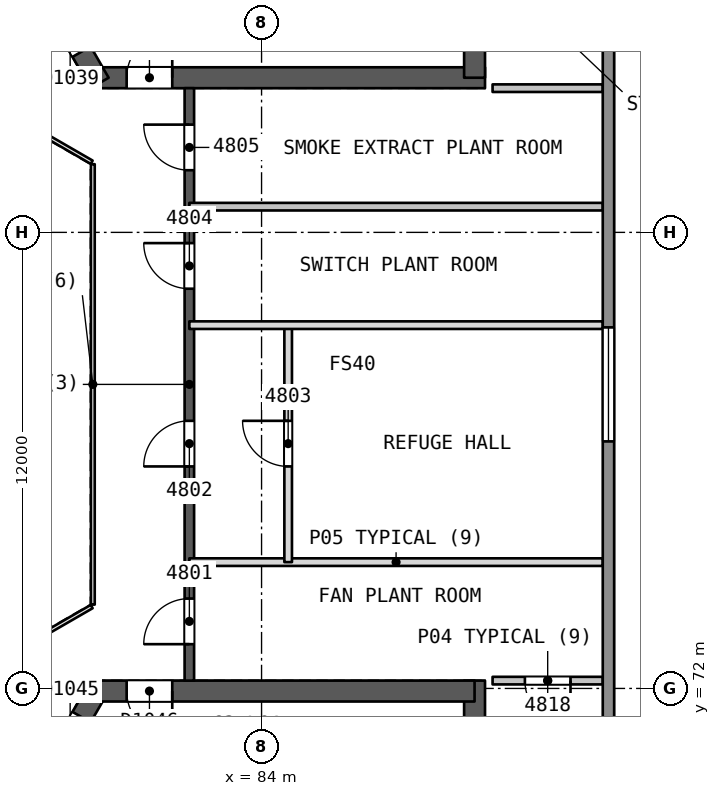
"""IFC4 building model, lengths in metres.
Left out: names, types, materials, properties, quantities, classifications, styles, units other than length and angle.
Written with IfcOpenShell. Run it as: python <this file> out.ifc"""

import sys

from ifc_helpers import new_model, si_unit, direction, frame, frame_2d, origin, place, context, subcontext, project, spatial, rectangle, extrude, element, fill, save


model = new_model("IFC4")
c1 = context("Model", 3, precision=1e-05, world=origin(), true_north=direction((0.0, 1.0)))
c2 = subcontext(c1, "Body", "Model", "MODEL_VIEW")
j1 = project(units=[si_unit("LENGTHUNIT", "METRE"), si_unit("PLANEANGLEUNIT", "RADIAN")], contexts=[c1])
p1 = place(None, origin())
s1 = spatial("IfcSite", under=j1, at=p1, CompositionType="ELEMENT")
p2 = place(p1, origin())
s2 = spatial("IfcBuilding", under=s1, at=p2, CompositionType="ELEMENT")
p3 = place(p2, frame((0.0, 0.0, 197.0)))
s3 = spatial("IfcBuildingStorey", under=s2, at=p3, CompositionType="ELEMENT", Elevation=197.0)
p4 = place(p3, frame((79.659, 88.069, 0.0), z_axis=(0.0, 0.0, 1.0), x_axis=(1.0, 0.0, 0.0)))
e1 = element("IfcWall", 1, at=p4, inside=s3, PredefinedType="SHEAR", context=c2, shape_type="SweptSolid", body=[
    extrude(rectangle(XDim=10.221, YDim=0.55, at=frame_2d((5.111, 0.0))), origin(), (0.0, 0.0, 1.0), 4.4),
])
p5 = place(p4, frame((0.791, 0.0, 0.0)))
e2 = element("IfcOpeningElement", 2, at=p5, cuts=e1, PredefinedType="OPENING", context=c2, shape_type="SweptSolid", body=[
    extrude(rectangle(XDim=1.2, YDim=2.1, at=frame_2d((0.6, 1.05))), frame((0.0, 0.286, 0.0), z_axis=(0.0, -1.0, 0.0), x_axis=(1.0, 0.0, 0.0)), (0.0, 0.0, 1.0), 0.571),
])
p6 = place(p3, frame((89.605, 88.069, 0.0), z_axis=(0.0, 0.0, 1.0), x_axis=(0.0, 1.0, 0.0)))
e3 = element("IfcWall", 3, at=p6, inside=s3, PredefinedType="SHEAR", context=c2, shape_type="SweptSolid", body=[
    extrude(rectangle(XDim=14.058, YDim=0.55, at=frame_2d((7.029, 0.0))), origin(), (0.0, 0.0, 1.0), 4.4),
])
p7 = place(p6, frame((6.475, 0.0, 0.0)))
e4 = element("IfcOpeningElement", 4, at=p7, cuts=e3, PredefinedType="OPENING", context=c2, shape_type="SweptSolid", body=[
    extrude(rectangle(XDim=1.1, YDim=2.1, at=frame_2d((0.55, 1.05))), frame((0.0, 0.286, 0.0), z_axis=(0.0, -1.0, 0.0), x_axis=(1.0, 0.0, 0.0)), (0.0, 0.0, 1.0), 0.571),
])
p8 = place(p3, frame((74.686, 96.683, 0.0), z_axis=(0.0, 0.0, 1.0), x_axis=(0.499997818338, -0.866026663364, 0.0)))
e5 = element("IfcWall", 5, at=p8, inside=s3, PredefinedType="SHEAR", context=c2, shape_type="SweptSolid", body=[
    extrude(rectangle(XDim=10.105, YDim=0.55, at=frame_2d((5.052, 0.0))), origin(), (0.0, 0.0, 1.0), 4.4),
])
p9 = place(p8, frame((7.955, 0.0, 0.0)))
e6 = element("IfcOpeningElement", 6, at=p9, cuts=e5, PredefinedType="OPENING", context=c2, shape_type="SweptSolid", body=[
    extrude(rectangle(XDim=1.2, YDim=2.1, at=frame_2d((0.6, 1.05))), frame((0.0, 0.286, 0.0), z_axis=(0.0, -1.0, 0.0), x_axis=(1.0, 0.0, 0.0)), (0.0, 0.0, 1.0), 0.571),
])
p10 = place(p3, frame((79.659, 71.931, 0.0), z_axis=(0.0, 0.0, 1.0), x_axis=(-0.500000202252, -0.866025287014, 0.0)))
e7 = element("IfcWall", 7, at=p10, inside=s3, PredefinedType="SHEAR", context=c2, shape_type="SweptSolid", body=[
    extrude(rectangle(XDim=10.221, YDim=0.55, at=frame_2d((5.111, 0.0))), origin(), (0.0, 0.0, 1.0), 4.4),
])
p11 = place(p10, frame((0.791, 0.0, 0.0)))
e8 = element("IfcOpeningElement", 8, at=p11, cuts=e7, PredefinedType="OPENING", context=c2, shape_type="SweptSolid", body=[
    extrude(rectangle(XDim=1.2, YDim=2.1, at=frame_2d((0.6, 1.05))), frame((0.0, 0.286, 0.0), z_axis=(0.0, -1.0, 0.0), x_axis=(1.0, 0.0, 0.0)), (0.0, 0.0, 1.0), 0.571),
])
p12 = place(p3, frame((89.605, 58.031, 0.0), z_axis=(0.0, 0.0, 1.0), x_axis=(0.0, 1.0, 0.0)))
e9 = element("IfcWall", 9, at=p12, inside=s3, PredefinedType="SHEAR", context=c2, shape_type="SweptSolid", body=[
    extrude(rectangle(XDim=14.175, YDim=0.55, at=frame_2d((7.087, 0.0))), origin(), (0.0, 0.0, 1.0), 4.4),
])
p13 = place(p3, frame((89.605, 71.931, 0.0), z_axis=(0.0, 0.0, 1.0), x_axis=(-1.0, 0.0, 0.0)))
e10 = element("IfcWall", 10, at=p13, inside=s3, PredefinedType="SHEAR", context=c2, shape_type="SweptSolid", body=[
    extrude(rectangle(XDim=10.105, YDim=0.55, at=frame_2d((5.052, 0.0))), origin(), (0.0, 0.0, 1.0), 4.4),
])
p14 = place(p13, frame((7.955, 0.0, 0.0)))
e11 = element("IfcOpeningElement", 11, at=p14, cuts=e10, PredefinedType="OPENING", context=c2, shape_type="SweptSolid", body=[
    extrude(rectangle(XDim=1.2, YDim=2.1, at=frame_2d((0.6, 1.05))), frame((0.0, 0.286, 0.0), z_axis=(0.0, -1.0, 0.0), x_axis=(1.0, 0.0, 0.0)), (0.0, 0.0, 1.0), 0.571),
])
p15 = place(p3, frame((82.1, 72.206, 0.0), z_axis=(0.0, 0.0, 1.0), x_axis=(0.0, 1.0, 0.0)))
e12 = element("IfcWall", 12, at=p15, inside=s3, PredefinedType="SHEAR", context=c2, shape_type="SweptSolid", body=[
    extrude(rectangle(XDim=15.588, YDim=0.25, at=frame_2d((7.794, 0.0))), origin(), (0.0, 0.0, 1.0), 3.95),
])
p16 = place(p15, frame((0.959, 0.0, 0.0)))
e13 = element("IfcOpeningElement", 13, at=p16, cuts=e12, PredefinedType="OPENING", context=c2, shape_type="SweptSolid", body=[
    extrude(rectangle(XDim=1.2, YDim=2.4, at=frame_2d((0.6, 1.2))), frame((0.0, 0.135, 0.0), z_axis=(0.0, -1.0, 0.0), x_axis=(1.0, 0.0, 0.0)), (0.0, 0.0, 1.0), 0.271),
])
p17 = place(p15, frame((5.635, 0.0, 0.0)))
e14 = element("IfcOpeningElement", 14, at=p17, cuts=e12, PredefinedType="OPENING", context=c2, shape_type="SweptSolid", body=[
    extrude(rectangle(XDim=1.2, YDim=2.4, at=frame_2d((0.6, 1.2))), frame((0.0, 0.135, 0.0), z_axis=(0.0, -1.0, 0.0), x_axis=(1.0, 0.0, 0.0)), (0.0, 0.0, 1.0), 0.271),
])
p18 = place(p15, frame((10.312, 0.0, 0.0)))
e15 = element("IfcOpeningElement", 15, at=p18, cuts=e12, PredefinedType="OPENING", context=c2, shape_type="SweptSolid", body=[
    extrude(rectangle(XDim=1.2, YDim=2.4, at=frame_2d((0.6, 1.2))), frame((0.0, 0.135, 0.0), z_axis=(0.0, -1.0, 0.0), x_axis=(1.0, 0.0, 0.0)), (0.0, 0.0, 1.0), 0.271),
])
p19 = place(p15, frame((13.43, 0.0, 0.0)))
e16 = element("IfcOpeningElement", 16, at=p19, cuts=e12, PredefinedType="OPENING", context=c2, shape_type="SweptSolid", body=[
    extrude(rectangle(XDim=1.2, YDim=2.4, at=frame_2d((0.6, 1.2))), frame((0.0, 0.135, 0.0), z_axis=(0.0, -1.0, 0.0), x_axis=(1.0, 0.0, 0.0)), (0.0, 0.0, 1.0), 0.271),
])
p20 = place(p3, frame((92.979, 75.323, 0.0), z_axis=(0.0, 0.0, 1.0), x_axis=(-1.0, 0.0, 0.0)))
e17 = element("IfcWall", 17, at=p20, inside=s3, PredefinedType="PARTITIONING", context=c2, shape_type="SweptSolid", body=[
    extrude(rectangle(XDim=10.879, YDim=0.2, at=frame_2d((5.44, 0.0))), origin(), (0.0, 0.0, 1.0), 3.95),
])
p21 = place(p3, frame((92.979, 72.206, 0.0), z_axis=(0.0, 0.0, 1.0), x_axis=(-1.0, 0.0, 0.0)))
e18 = element("IfcWall", 18, at=p21, inside=s3, PredefinedType="PARTITIONING", context=c2, shape_type="SweptSolid", body=[
    extrude(rectangle(XDim=2.9, YDim=0.2, at=frame_2d((1.45, 0.0))), origin(), (0.0, 0.0, 1.0), 3.95),
])
p22 = place(p21, frame((0.85, 0.0, 0.0)))
e19 = element("IfcOpeningElement", 19, at=p22, cuts=e18, PredefinedType="OPENING", context=c2, shape_type="SweptSolid", body=[
    extrude(rectangle(XDim=1.2, YDim=2.4, at=frame_2d((0.6, 1.2))), frame((0.0, 0.11, 0.0), z_axis=(0.0, -1.0, 0.0), x_axis=(1.0, 0.0, 0.0)), (0.0, 0.0, 1.0), 0.221),
])
p23 = place(p3, frame((84.7, 75.323, 0.0), z_axis=(0.0, 0.0, 1.0), x_axis=(0.0, 1.0, 0.0)))
e20 = element("IfcWall", 20, at=p23, inside=s3, PredefinedType="PARTITIONING", context=c2, shape_type="SweptSolid", body=[
    extrude(rectangle(XDim=6.235, YDim=0.2, at=frame_2d((3.118, 0.0))), origin(), (0.0, 0.0, 1.0), 3.95),
])
p24 = place(p23, frame((2.518, 0.0, 0.0)))
e21 = element("IfcOpeningElement", 21, at=p24, cuts=e20, PredefinedType="OPENING", context=c2, shape_type="SweptSolid", body=[
    extrude(rectangle(XDim=1.2, YDim=2.4, at=frame_2d((0.6, 1.2))), frame((0.0, 0.11, 0.0), z_axis=(0.0, -1.0, 0.0), x_axis=(1.0, 0.0, 0.0)), (0.0, 0.0, 1.0), 0.221),
])
for number, where, z_axis, x_axis in (
    (22, (92.979, 81.559, 0.0), (0.0, 0.0, 1.0), (-1.0, 0.0, 0.0)),
    (23, (92.979, 84.677, 0.0), (0.0, 0.0, 1.0), (-1.0, 0.0, 0.0)),
):
    element("IfcWall", number, at=place(p3, frame(where, z_axis=z_axis, x_axis=x_axis)), inside=s3, PredefinedType="PARTITIONING", context=c2, shape_type="SweptSolid", body=[
        extrude(rectangle(XDim=10.879, YDim=0.2, at=frame_2d((5.44, 0.0))), origin(), (0.0, 0.0, 1.0), 3.95),
    ])
p25 = place(p3, frame((90.079, 87.794, 0.0), z_axis=(0.0, 0.0, 1.0), x_axis=(1.0, 0.0, 0.0)))
e24 = element("IfcWall", 24, at=p25, inside=s3, PredefinedType="PARTITIONING", context=c2, shape_type="SweptSolid", body=[
    extrude(rectangle(XDim=2.9, YDim=0.2, at=frame_2d((1.45, 0.0))), origin(), (0.0, 0.0, 1.0), 3.95),
])
p26 = place(p3, frame((93.128, 106.066, 0.0), z_axis=(0.0, 0.0, 1.0), x_axis=(0.0, -1.0, 0.0)))
e25 = element("IfcWall", 25, at=p26, inside=s3, PredefinedType="SOLIDWALL", context=c2, shape_type="SweptSolid", body=[
    extrude(rectangle(XDim=52.132, YDim=0.3, at=frame_2d((26.066, 0.0))), origin(), (0.0, 0.0, 1.0), 3.95),
])
p27 = place(p26, frame((8.193, 0.0, 0.9)))
e26 = element("IfcOpeningElement", 26, at=p27, cuts=e25, PredefinedType="OPENING", context=c2, shape_type="SweptSolid", body=[
    extrude(rectangle(XDim=1.8, YDim=1.5, at=frame_2d((0.9, 0.75))), frame((0.0, 0.161, 0.0), z_axis=(0.0, -1.0, 0.0), x_axis=(1.0, 0.0, 0.0)), (0.0, 0.0, 1.0), 0.321),
])
p28 = place(p26, frame((42.139, 0.0, 0.9)))
e27 = element("IfcOpeningElement", 27, at=p28, cuts=e25, PredefinedType="OPENING", context=c2, shape_type="SweptSolid", body=[
    extrude(rectangle(XDim=1.8, YDim=1.5, at=frame_2d((0.9, 0.75))), frame((0.0, 0.161, 0.0), z_axis=(0.0, -1.0, 0.0), x_axis=(1.0, 0.0, 0.0)), (0.0, 0.0, 1.0), 0.321),
])
p29 = place(p26, frame((3.713, 0.0, 0.6)))
e28 = element("IfcOpeningElement", 28, at=p29, cuts=e25, PredefinedType="OPENING", context=c2, shape_type="SweptSolid", body=[
    extrude(rectangle(XDim=3.0, YDim=2.4, at=frame_2d((1.5, 1.2))), frame((0.0, 0.161, 0.0), z_axis=(0.0, -1.0, 0.0), x_axis=(1.0, 0.0, 0.0)), (0.0, 0.0, 1.0), 0.321),
])
p30 = place(p26, frame((14.14, 0.0, 0.6)))
e29 = element("IfcOpeningElement", 29, at=p30, cuts=e25, PredefinedType="OPENING", context=c2, shape_type="SweptSolid", body=[
    extrude(rectangle(XDim=3.0, YDim=2.4, at=frame_2d((1.5, 1.2))), frame((0.0, 0.161, 0.0), z_axis=(0.0, -1.0, 0.0), x_axis=(1.0, 0.0, 0.0)), (0.0, 0.0, 1.0), 0.321),
])
p31 = place(p26, frame((24.566, 0.0, 0.6)))
e30 = element("IfcOpeningElement", 30, at=p31, cuts=e25, PredefinedType="OPENING", context=c2, shape_type="SweptSolid", body=[
    extrude(rectangle(XDim=3.0, YDim=2.4, at=frame_2d((1.5, 1.2))), frame((0.0, 0.161, 0.0), z_axis=(0.0, -1.0, 0.0), x_axis=(1.0, 0.0, 0.0)), (0.0, 0.0, 1.0), 0.321),
])
p32 = place(p26, frame((34.992, 0.0, 0.6)))
e31 = element("IfcOpeningElement", 31, at=p32, cuts=e25, PredefinedType="OPENING", context=c2, shape_type="SweptSolid", body=[
    extrude(rectangle(XDim=3.0, YDim=2.4, at=frame_2d((1.5, 1.2))), frame((0.0, 0.161, 0.0), z_axis=(0.0, -1.0, 0.0), x_axis=(1.0, 0.0, 0.0)), (0.0, 0.0, 1.0), 0.321),
])
p33 = place(p26, frame((45.419, 0.0, 0.6)))
e32 = element("IfcOpeningElement", 32, at=p33, cuts=e25, PredefinedType="OPENING", context=c2, shape_type="SweptSolid", body=[
    extrude(rectangle(XDim=3.0, YDim=2.4, at=frame_2d((1.5, 1.2))), frame((0.0, 0.161, 0.0), z_axis=(0.0, -1.0, 0.0), x_axis=(1.0, 0.0, 0.0)), (0.0, 0.0, 1.0), 0.321),
])
p34 = place(p3, frame((43.362, 82.667, 0.0), z_axis=(0.0, 0.0, 1.0), x_axis=(0.866025243948, 0.500000276845, 0.0)))
e33 = element("IfcWall", 33, at=p34, inside=s3, PredefinedType="SOLIDWALL", context=c2, shape_type="SweptSolid", body=[
    extrude(rectangle(XDim=52.132, YDim=0.3, at=frame_2d((26.066, 0.0))), origin(), (0.0, 0.0, 1.0), 3.95),
])
p35 = place(p34, frame((8.193, 0.0, 0.9)))
e34 = element("IfcOpeningElement", 34, at=p35, cuts=e33, PredefinedType="OPENING", context=c2, shape_type="SweptSolid", body=[
    extrude(rectangle(XDim=1.8, YDim=1.5, at=frame_2d((0.9, 0.75))), frame((0.0, 0.161, 0.0), z_axis=(0.0, -1.0, 0.0), x_axis=(1.0, 0.0, 0.0)), (0.0, 0.0, 1.0), 0.321),
])
p36 = place(p34, frame((42.139, 0.0, 0.9)))
e35 = element("IfcOpeningElement", 35, at=p36, cuts=e33, PredefinedType="OPENING", context=c2, shape_type="SweptSolid", body=[
    extrude(rectangle(XDim=1.8, YDim=1.5, at=frame_2d((0.9, 0.75))), frame((0.0, 0.161, 0.0), z_axis=(0.0, -1.0, 0.0), x_axis=(1.0, 0.0, 0.0)), (0.0, 0.0, 1.0), 0.321),
])
p37 = place(p34, frame((3.713, 0.0, 0.6)))
e36 = element("IfcOpeningElement", 36, at=p37, cuts=e33, PredefinedType="OPENING", context=c2, shape_type="SweptSolid", body=[
    extrude(rectangle(XDim=3.0, YDim=2.4, at=frame_2d((1.5, 1.2))), frame((0.0, 0.161, 0.0), z_axis=(0.0, -1.0, 0.0), x_axis=(1.0, 0.0, 0.0)), (0.0, 0.0, 1.0), 0.321),
])
p38 = place(p34, frame((14.14, 0.0, 0.6)))
e37 = element("IfcOpeningElement", 37, at=p38, cuts=e33, PredefinedType="OPENING", context=c2, shape_type="SweptSolid", body=[
    extrude(rectangle(XDim=3.0, YDim=2.4, at=frame_2d((1.5, 1.2))), frame((0.0, 0.161, 0.0), z_axis=(0.0, -1.0, 0.0), x_axis=(1.0, 0.0, 0.0)), (0.0, 0.0, 1.0), 0.321),
])
p39 = place(p34, frame((24.566, 0.0, 0.6)))
e38 = element("IfcOpeningElement", 38, at=p39, cuts=e33, PredefinedType="OPENING", context=c2, shape_type="SweptSolid", body=[
    extrude(rectangle(XDim=3.0, YDim=2.4, at=frame_2d((1.5, 1.2))), frame((0.0, 0.161, 0.0), z_axis=(0.0, -1.0, 0.0), x_axis=(1.0, 0.0, 0.0)), (0.0, 0.0, 1.0), 0.321),
])
p40 = place(p34, frame((34.992, 0.0, 0.6)))
e39 = element("IfcOpeningElement", 39, at=p40, cuts=e33, PredefinedType="OPENING", context=c2, shape_type="SweptSolid", body=[
    extrude(rectangle(XDim=3.0, YDim=2.4, at=frame_2d((1.5, 1.2))), frame((0.0, 0.161, 0.0), z_axis=(0.0, -1.0, 0.0), x_axis=(1.0, 0.0, 0.0)), (0.0, 0.0, 1.0), 0.321),
])
p41 = place(p34, frame((45.419, 0.0, 0.6)))
e40 = element("IfcOpeningElement", 40, at=p41, cuts=e33, PredefinedType="OPENING", context=c2, shape_type="SweptSolid", body=[
    extrude(rectangle(XDim=3.0, YDim=2.4, at=frame_2d((1.5, 1.2))), frame((0.0, 0.161, 0.0), z_axis=(0.0, -1.0, 0.0), x_axis=(1.0, 0.0, 0.0)), (0.0, 0.0, 1.0), 0.321),
])
p42 = place(p3, frame((88.51, 51.267, 0.0), z_axis=(0.0, 0.0, 1.0), x_axis=(-0.866025243948, 0.500000276845, 0.0)))
e41 = element("IfcWall", 41, at=p42, inside=s3, PredefinedType="SOLIDWALL", context=c2, shape_type="SweptSolid", body=[
    extrude(rectangle(XDim=52.132, YDim=0.3, at=frame_2d((26.066, 0.0))), origin(), (0.0, 0.0, 1.0), 3.95),
])
p43 = place(p42, frame((42.139, 0.0, 0.9)))
e42 = element("IfcOpeningElement", 42, at=p43, cuts=e41, PredefinedType="OPENING", context=c2, shape_type="SweptSolid", body=[
    extrude(rectangle(XDim=1.8, YDim=1.5, at=frame_2d((0.9, 0.75))), frame((0.0, 0.161, 0.0), z_axis=(0.0, -1.0, 0.0), x_axis=(1.0, 0.0, 0.0)), (0.0, 0.0, 1.0), 0.321),
])
p44 = place(p42, frame((8.193, 0.0, 0.9)))
e43 = element("IfcOpeningElement", 43, at=p44, cuts=e41, PredefinedType="OPENING", context=c2, shape_type="SweptSolid", body=[
    extrude(rectangle(XDim=1.8, YDim=1.5, at=frame_2d((0.9, 0.75))), frame((0.0, 0.161, 0.0), z_axis=(0.0, -1.0, 0.0), x_axis=(1.0, 0.0, 0.0)), (0.0, 0.0, 1.0), 0.321),
])
p45 = place(p42, frame((3.713, 0.0, 0.6)))
e44 = element("IfcOpeningElement", 44, at=p45, cuts=e41, PredefinedType="OPENING", context=c2, shape_type="SweptSolid", body=[
    extrude(rectangle(XDim=3.0, YDim=2.4, at=frame_2d((1.5, 1.2))), frame((0.0, 0.161, 0.0), z_axis=(0.0, -1.0, 0.0), x_axis=(1.0, 0.0, 0.0)), (0.0, 0.0, 1.0), 0.321),
])
p46 = place(p42, frame((14.14, 0.0, 0.6)))
e45 = element("IfcOpeningElement", 45, at=p46, cuts=e41, PredefinedType="OPENING", context=c2, shape_type="SweptSolid", body=[
    extrude(rectangle(XDim=3.0, YDim=2.4, at=frame_2d((1.5, 1.2))), frame((0.0, 0.161, 0.0), z_axis=(0.0, -1.0, 0.0), x_axis=(1.0, 0.0, 0.0)), (0.0, 0.0, 1.0), 0.321),
])
p47 = place(p42, frame((24.566, 0.0, 0.6)))
e46 = element("IfcOpeningElement", 46, at=p47, cuts=e41, PredefinedType="OPENING", context=c2, shape_type="SweptSolid", body=[
    extrude(rectangle(XDim=3.0, YDim=2.4, at=frame_2d((1.5, 1.2))), frame((0.0, 0.161, 0.0), z_axis=(0.0, -1.0, 0.0), x_axis=(1.0, 0.0, 0.0)), (0.0, 0.0, 1.0), 0.321),
])
p48 = place(p42, frame((34.992, 0.0, 0.6)))
e47 = element("IfcOpeningElement", 47, at=p48, cuts=e41, PredefinedType="OPENING", context=c2, shape_type="SweptSolid", body=[
    extrude(rectangle(XDim=3.0, YDim=2.4, at=frame_2d((1.5, 1.2))), frame((0.0, 0.161, 0.0), z_axis=(0.0, -1.0, 0.0), x_axis=(1.0, 0.0, 0.0)), (0.0, 0.0, 1.0), 0.321),
])
p49 = place(p42, frame((45.419, 0.0, 0.6)))
e48 = element("IfcOpeningElement", 48, at=p49, cuts=e41, PredefinedType="OPENING", context=c2, shape_type="SweptSolid", body=[
    extrude(rectangle(XDim=3.0, YDim=2.4, at=frame_2d((1.5, 1.2))), frame((0.0, 0.161, 0.0), z_axis=(0.0, -1.0, 0.0), x_axis=(1.0, 0.0, 0.0)), (0.0, 0.0, 1.0), 0.321),
])
p50 = place(p3, frame((79.56, 74.206, 0.0), z_axis=(0.0, 0.0, 1.0), x_axis=(0.0, 1.0, 0.0)))
e49 = element("IfcWall", 49, at=p50, inside=s3, PredefinedType="PARTITIONING", context=c2, shape_type="SweptSolid", body=[
    extrude(rectangle(XDim=11.588, YDim=0.1, at=frame_2d((5.794, 0.0))), origin(), (0.0, 0.0, 1.0), 3.95),
])
for number, where, z_axis, x_axis in (
    (50, (79.53, 85.846, 0.0), (0.0, 0.0, 1.0), (-0.866, 0.5, 0.0)),
    (51, (77.798, 73.154, 0.0), (0.0, 0.0, 1.0), (0.866, 0.5, 0.0)),
):
    element("IfcWall", number, at=place(p3, frame(where, z_axis=z_axis, x_axis=x_axis)), inside=s3, PredefinedType="PARTITIONING", context=c2, shape_type="SweptSolid", body=[
        extrude(rectangle(XDim=2.0, YDim=0.1, at=frame_2d((1.0, 0.0))), origin(), (0.0, 0.0, 1.0), 3.95),
    ])
p51 = place(p16, origin())
e52 = element("IfcDoor", 52, at=p51, inside=s3, OperationType="SINGLE_SWING_LEFT", PredefinedType="NOTDEFINED", context=c2, shape_type="SweptSolid", body=[
    extrude(rectangle(XDim=1.2, YDim=2.4, at=frame_2d((0.6, 1.2))), frame((0.0, 0.025, 0.0), z_axis=(0.0, -1.0, 0.0), x_axis=(1.0, 0.0, 0.0)), (0.0, 0.0, 1.0), 0.05),
])
fill(e13, e52)
p52 = place(p17, origin())
e53 = element("IfcDoor", 53, at=p52, inside=s3, OperationType="SINGLE_SWING_LEFT", PredefinedType="NOTDEFINED", context=c2, shape_type="SweptSolid", body=[
    extrude(rectangle(XDim=1.2, YDim=2.4, at=frame_2d((0.6, 1.2))), frame((0.0, 0.025, 0.0), z_axis=(0.0, -1.0, 0.0), x_axis=(1.0, 0.0, 0.0)), (0.0, 0.0, 1.0), 0.05),
])
fill(e14, e53)
p53 = place(p24, origin())
e54 = element("IfcDoor", 54, at=p53, inside=s3, OperationType="SINGLE_SWING_RIGHT", PredefinedType="NOTDEFINED", context=c2, shape_type="SweptSolid", body=[
    extrude(rectangle(XDim=1.2, YDim=2.4, at=frame_2d((0.6, 1.2))), frame((0.0, 0.025, 0.0), z_axis=(0.0, -1.0, 0.0), x_axis=(1.0, 0.0, 0.0)), (0.0, 0.0, 1.0), 0.05),
])
fill(e21, e54)
p54 = place(p18, origin())
e55 = element("IfcDoor", 55, at=p54, inside=s3, OperationType="SINGLE_SWING_RIGHT", PredefinedType="NOTDEFINED", context=c2, shape_type="SweptSolid", body=[
    extrude(rectangle(XDim=1.2, YDim=2.4, at=frame_2d((0.6, 1.2))), frame((0.0, 0.025, 0.0), z_axis=(0.0, -1.0, 0.0), x_axis=(1.0, 0.0, 0.0)), (0.0, 0.0, 1.0), 0.05),
])
fill(e15, e55)
p55 = place(p19, origin())
e56 = element("IfcDoor", 56, at=p55, inside=s3, OperationType="SINGLE_SWING_RIGHT", PredefinedType="NOTDEFINED", context=c2, shape_type="SweptSolid", body=[
    extrude(rectangle(XDim=1.2, YDim=2.4, at=frame_2d((0.6, 1.2))), frame((0.0, 0.025, 0.0), z_axis=(0.0, -1.0, 0.0), x_axis=(1.0, 0.0, 0.0)), (0.0, 0.0, 1.0), 0.05),
])
fill(e16, e56)
p56 = place(p22, origin())
e57 = element("IfcDoor", 57, at=p56, inside=s3, OperationType="SINGLE_SWING_LEFT", PredefinedType="NOTDEFINED", context=c2, shape_type="SweptSolid", body=[
    extrude(rectangle(XDim=1.2, YDim=2.4, at=frame_2d((0.6, 1.2))), frame((0.0, 0.025, 0.0), z_axis=(0.0, -1.0, 0.0), x_axis=(1.0, 0.0, 0.0)), (0.0, 0.0, 1.0), 0.05),
])
fill(e19, e57)
p57 = place(p31, origin())
e58 = element("IfcWindow", 58, at=p57, inside=s3, PartitioningType="SINGLE_PANEL", PredefinedType="WINDOW", context=c2, shape_type="SweptSolid", body=[
    extrude(rectangle(XDim=3.0, YDim=2.4, at=frame_2d((1.5, 1.2))), frame((0.0, 0.03, 0.0), z_axis=(0.0, -1.0, 0.0), x_axis=(1.0, 0.0, 0.0)), (0.0, 0.0, 1.0), 0.06),
])
fill(e30, e58)
p58 = place(p5, origin())
e59 = element("IfcDoor", 59, at=p58, inside=s3, OperationType="SINGLE_SWING_RIGHT", PredefinedType="NOTDEFINED", context=c2, shape_type="SweptSolid", body=[
    extrude(rectangle(XDim=1.2, YDim=2.1, at=frame_2d((0.6, 1.05))), frame((0.0, 0.025, 0.0), z_axis=(0.0, -1.0, 0.0), x_axis=(1.0, 0.0, 0.0)), (0.0, 0.0, 1.0), 0.05),
])
fill(e2, e59)
p59 = place(p14, origin())
e60 = element("IfcDoor", 60, at=p59, inside=s3, OperationType="SINGLE_SWING_LEFT", PredefinedType="NOTDEFINED", context=c2, shape_type="SweptSolid", body=[
    extrude(rectangle(XDim=1.2, YDim=2.1, at=frame_2d((0.6, 1.05))), frame((0.0, 0.025, 0.0), z_axis=(0.0, -1.0, 0.0), x_axis=(1.0, 0.0, 0.0)), (0.0, 0.0, 1.0), 0.05),
])
fill(e11, e60)
save(model, sys.argv[1])
